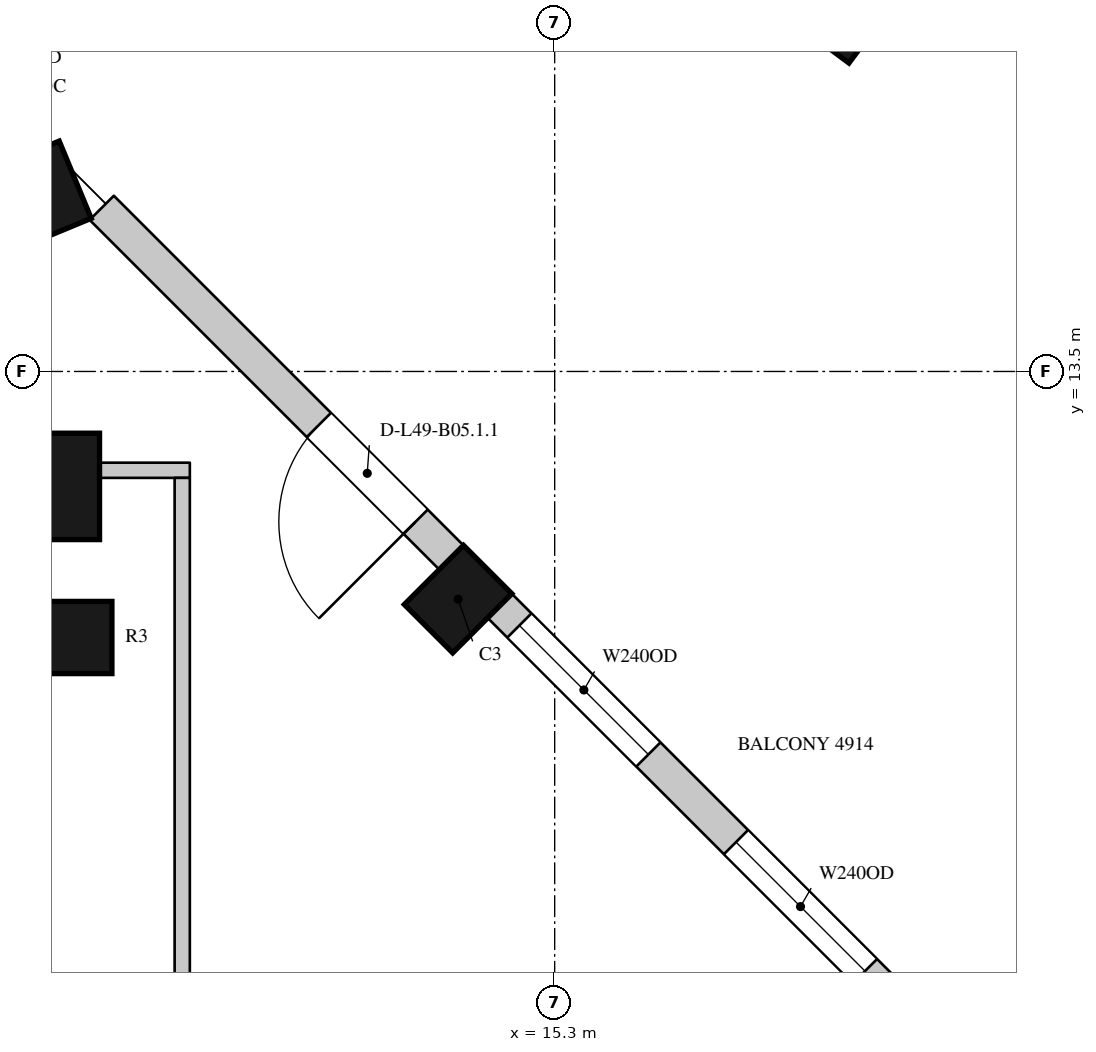
"""IFC4 building model, lengths in metres.
Left out: names, types, materials, properties, quantities, classifications, styles, units other than length and angle.
Written with IfcOpenShell. Run it as: python <this file> out.ifc"""

import sys

from ifc_helpers import new_model, si_unit, direction, frame, frame_2d, origin, origin_2d, place, context, subcontext, project, spatial, rectangle, circle, extrude, element, fill, save


model = new_model("IFC4")
c1 = context("Model", 3, precision=1e-05, world=origin(), true_north=direction((0.0, 1.0)))
c2 = subcontext(c1, "Body", "Model", "MODEL_VIEW")
j1 = project(units=[si_unit("LENGTHUNIT", "METRE"), si_unit("PLANEANGLEUNIT", "RADIAN")], contexts=[c1])
p1 = place(None, origin())
s1 = spatial("IfcSite", under=j1, at=p1, CompositionType="ELEMENT")
p2 = place(p1, origin())
s2 = spatial("IfcBuilding", under=s1, at=p2, CompositionType="ELEMENT")
p3 = place(p2, frame((0.0, 0.0, 222.0)))
s3 = spatial("IfcBuildingStorey", under=s2, at=p3, CompositionType="ELEMENT", Elevation=222.0)
for number, where, z_axis, x_axis in (
    (1, (14.029, 10.505, 0.0), (0.0, 0.0, 1.0), (-0.707, 0.707, 0.0)),
    (2, (8.576, 15.85, 0.0), (0.0, 0.0, 1.0), (-0.924, -0.383, 0.0)),
):
    element("IfcColumn", number, at=place(p3, frame(where, z_axis=z_axis, x_axis=x_axis)), inside=s3, PredefinedType="COLUMN", context=c2, shape_type="SweptSolid", body=[
        extrude(rectangle(XDim=0.9, YDim=1.1, at=origin_2d()), origin(), (0.0, 0.0, 1.0), 4.1),
    ])
p4 = place(p3, frame((8.612, 11.988, 0.0), z_axis=(0.0, 0.0, 1.0), x_axis=(1.0, 0.0, 0.0)))
e3 = element("IfcColumn", 3, at=p4, inside=s3, PredefinedType="COLUMN", context=c2, shape_type="SweptSolid", body=[
    extrude(circle(Radius=0.7, at=origin_2d()), origin(), (0.0, 0.0, 1.0), 4.1),
])
p5 = place(p3, frame((19.138, 18.268, 0.0), z_axis=(0.0, 0.0, 1.0), x_axis=(-0.802798546114, 0.596250362144, 0.0)))
e4 = element("IfcColumn", 4, at=p5, inside=s3, PredefinedType="COLUMN", context=c2, shape_type="SweptSolid", body=[
    extrude(rectangle(XDim=0.9, YDim=1.1, at=origin_2d()), origin(), (0.0, 0.0, 1.0), 4.1),
])
p6 = place(p3, frame((9.0, 10.0, 0.0), z_axis=(0.0, 0.0, 1.0), x_axis=(1.0, 0.0, 0.0)))
e5 = element("IfcColumn", 5, at=p6, inside=s3, PredefinedType="COLUMN", context=c2, shape_type="SweptSolid", body=[
    extrude(circle(Radius=0.475, at=origin_2d()), origin(), (0.0, 0.0, 1.0), 4.1),
])
p7 = place(p3, frame((19.615, 5.379, 0.0), z_axis=(0.0, 0.0, 1.0), x_axis=(-0.707089646058, 0.7071239159, 0.0)))
e6 = element("IfcWall", 6, at=p7, inside=s3, PredefinedType="SOLIDWALL", context=c2, shape_type="SweptSolid", body=[
    extrude(rectangle(XDim=7.124, YDim=0.45, at=frame_2d((3.562, 0.0))), origin(), (0.0, 0.0, 1.0), 3.8),
])
p8 = place(p7, frame((0.328, 0.0, 1.05)))
e7 = element("IfcOpeningElement", 7, at=p8, cuts=e6, PredefinedType="OPENING", context=c2, shape_type="SweptSolid", body=[
    extrude(rectangle(XDim=2.4, YDim=2.4, at=frame_2d((1.2, 1.2))), frame((0.0, 0.235, 0.0), z_axis=(0.0, -1.0, 0.0), x_axis=(1.0, 0.0, 0.0)), (0.0, 0.0, 1.0), 0.47),
])
p9 = place(p7, frame((4.359, 0.0, 1.05)))
e8 = element("IfcOpeningElement", 8, at=p9, cuts=e6, PredefinedType="OPENING", context=c2, shape_type="SweptSolid", body=[
    extrude(rectangle(XDim=2.4, YDim=2.4, at=frame_2d((1.2, 1.2))), frame((0.0, 0.235, 0.0), z_axis=(0.0, -1.0, 0.0), x_axis=(1.0, 0.0, 0.0)), (0.0, 0.0, 1.0), 0.47),
])
p10 = place(p3, frame((13.941, 11.053, 0.0), z_axis=(0.0, 0.0, 1.0), x_axis=(-0.707106781187, 0.707106781187, 0.0)))
e9 = element("IfcWall", 9, at=p10, inside=s3, PredefinedType="SOLIDWALL", context=c2, shape_type="SweptSolid", body=[
    extrude(rectangle(XDim=6.505, YDim=0.45, at=frame_2d((3.252, 0.0))), origin(), (0.0, 0.0, 1.0), 3.8),
])
p11 = place(p10, frame((0.665, 0.0, 0.0)))
e10 = element("IfcOpeningElement", 10, at=p11, cuts=e9, PredefinedType="OPENING", context=c2, shape_type="SweptSolid", body=[
    extrude(rectangle(XDim=1.8, YDim=2.4, at=frame_2d((0.9, 1.2))), frame((0.0, 0.235, 0.0), z_axis=(0.0, -1.0, 0.0), x_axis=(1.0, 0.0, 0.0)), (0.0, 0.0, 1.0), 0.47),
])
p12 = place(p3, frame((18.65, 7.864, 0.0), z_axis=(0.0, 0.0, 1.0), x_axis=(-0.707059037574, 0.707154521576, 0.0)))
e11 = element("IfcWall", 11, at=p12, inside=s3, PredefinedType="SOLIDWALL", context=c2, shape_type="SweptSolid", body=[
    extrude(rectangle(XDim=2.557, YDim=0.45, at=frame_2d((1.278, 0.0))), origin(), (0.0, 0.0, 1.0), 0.6),
])
p13 = place(p3, frame((9.296, 12.2, 0.0), z_axis=(0.0, 0.0, 1.0), x_axis=(1.0, 0.0, 0.0)))
e12 = element("IfcWall", 12, at=p13, inside=s3, PredefinedType="PARTITIONING", context=c2, shape_type="SweptSolid", body=[
    extrude(rectangle(XDim=1.204, YDim=0.2, at=frame_2d((0.602, 0.0))), origin(), (0.0, 0.0, 1.0), 3.8),
])
p14 = place(p3, frame((10.4, -11.4, 0.0), z_axis=(0.0, 0.0, 1.0), x_axis=(0.0, 1.0, 0.0)))
e13 = element("IfcWall", 13, at=p14, inside=s3, PredefinedType="PARTITIONING", context=c2, shape_type="SweptSolid", body=[
    extrude(rectangle(XDim=23.5, YDim=0.2, at=frame_2d((11.75, 0.0))), origin(), (0.0, 0.0, 1.0), 3.8),
])
p15 = place(p14, frame((9.25, 0.0, 0.0)))
e14 = element("IfcOpeningElement", 14, at=p15, cuts=e13, PredefinedType="OPENING", context=c2, shape_type="SweptSolid", body=[
    extrude(rectangle(XDim=1.5, YDim=2.4, at=frame_2d((0.75, 1.2))), frame((0.0, 0.11, 0.0), z_axis=(0.0, -1.0, 0.0), x_axis=(1.0, 0.0, 0.0)), (0.0, 0.0, 1.0), 0.22),
])
p16 = place(p14, frame((2.85, 0.0, 0.0)))
e15 = element("IfcOpeningElement", 15, at=p16, cuts=e13, PredefinedType="OPENING", context=c2, shape_type="SweptSolid", body=[
    extrude(rectangle(XDim=1.1, YDim=2.4, at=frame_2d((0.55, 1.2))), frame((0.0, 0.11, 0.0), z_axis=(0.0, -1.0, 0.0), x_axis=(1.0, 0.0, 0.0)), (0.0, 0.0, 1.0), 0.22),
])
p17 = place(p8, origin())
e16 = element("IfcWindow", 16, at=p17, inside=s3, PartitioningType="SINGLE_PANEL", PredefinedType="WINDOW", context=c2, shape_type="SweptSolid", body=[
    extrude(rectangle(XDim=2.4, YDim=2.4, at=frame_2d((1.2, 1.2))), frame((0.0, 0.135, 0.0), z_axis=(0.0, -1.0, 0.0), x_axis=(1.0, 0.0, 0.0)), (0.0, 0.0, 1.0), 0.06),
])
fill(e7, e16)
p18 = place(p9, origin())
e17 = element("IfcWindow", 17, at=p18, inside=s3, PartitioningType="SINGLE_PANEL", PredefinedType="WINDOW", context=c2, shape_type="SweptSolid", body=[
    extrude(rectangle(XDim=2.4, YDim=2.4, at=frame_2d((1.2, 1.2))), frame((0.0, 0.135, 0.0), z_axis=(0.0, -1.0, 0.0), x_axis=(1.0, 0.0, 0.0)), (0.0, 0.0, 1.0), 0.06),
])
fill(e8, e17)
p19 = place(p11, origin())
e18 = element("IfcDoor", 18, at=p19, inside=s3, OperationType="SLIDING_TO_LEFT", PredefinedType="DOOR", context=c2, shape_type="SweptSolid", body=[
    extrude(rectangle(XDim=1.8, YDim=2.4, at=frame_2d((0.9, 1.2))), frame((0.0, 0.13, 0.0), z_axis=(0.0, -1.0, 0.0), x_axis=(1.0, 0.0, 0.0)), (0.0, 0.0, 1.0), 0.05),
])
fill(e10, e18)
save(model, sys.argv[1])
